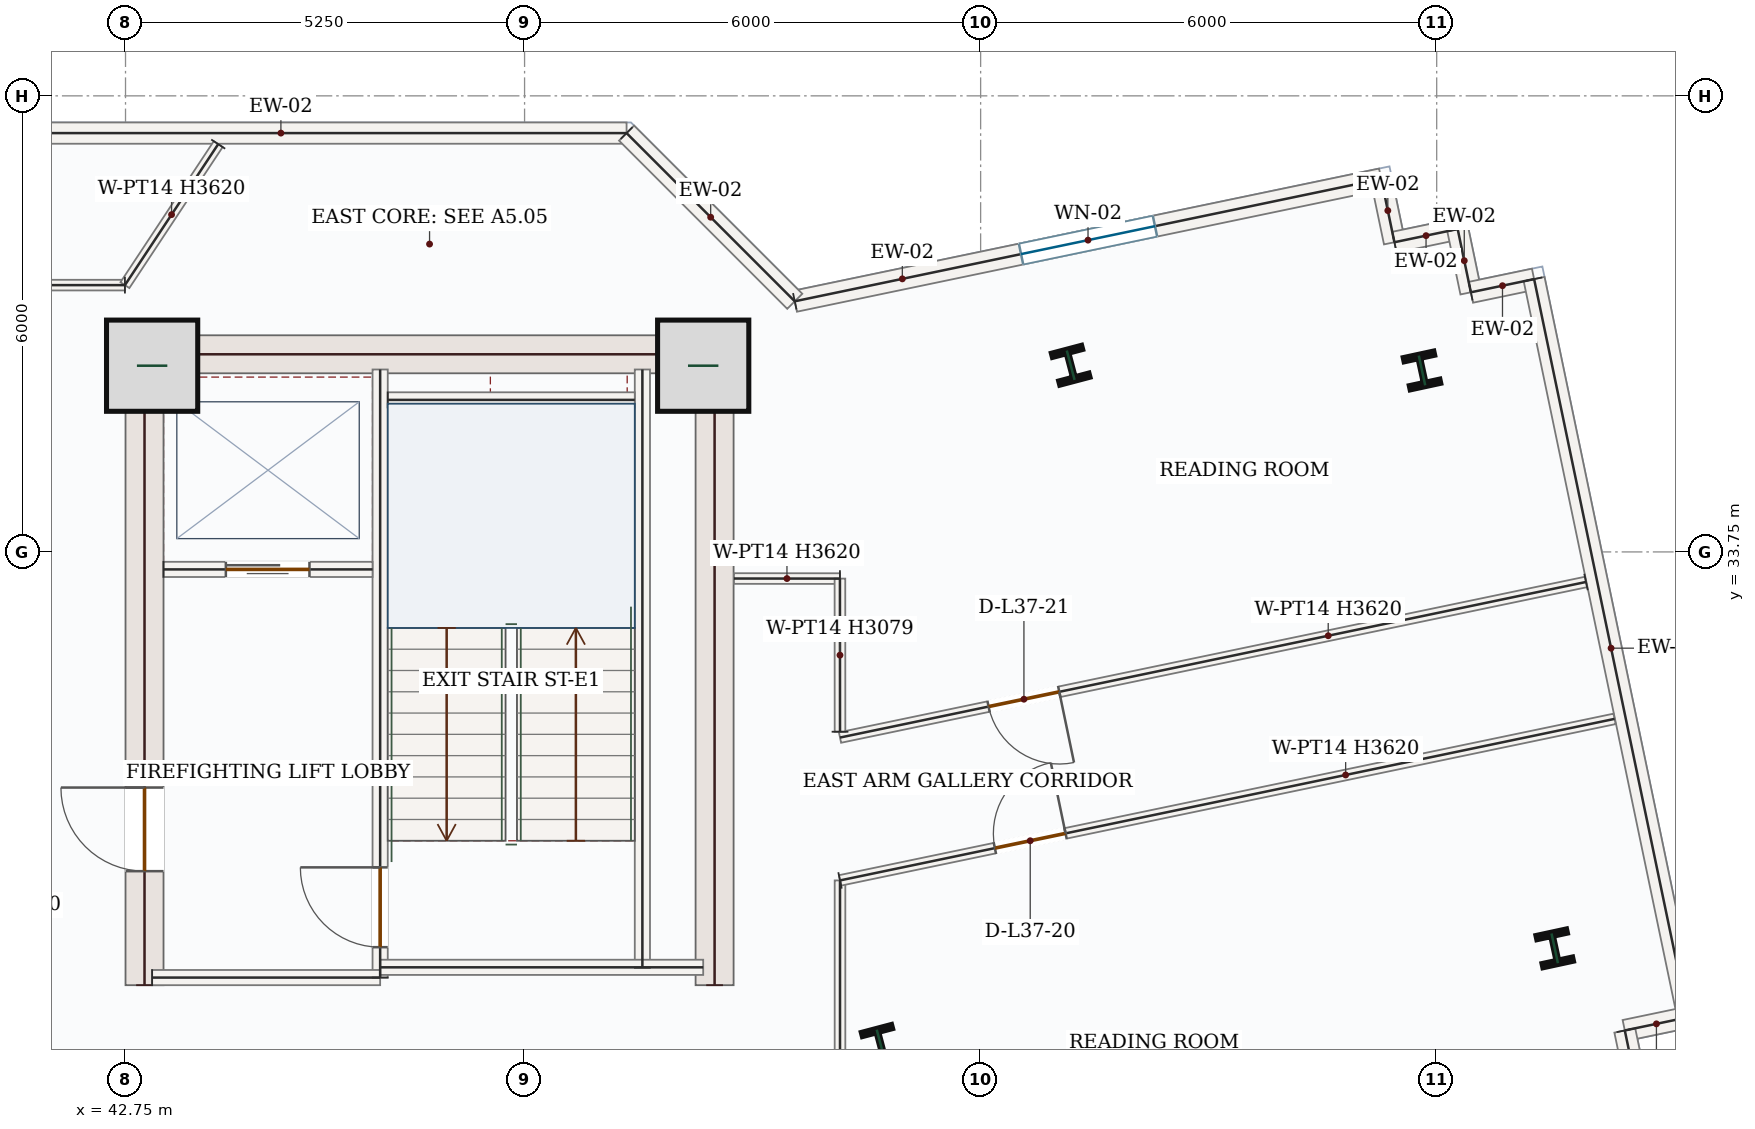
"""IFC4 building model, lengths in metres.
Left out: names, types, materials, properties, quantities, classifications, styles, units other than length and angle.
Written with IfcOpenShell. Run it as: python <this file> out.ifc"""

import sys

from ifc_helpers import new_model, si_unit, direction, frame, frame_2d, origin, origin_2d, place, context, subcontext, project, spatial, rectangle, i_section, extrude, source, transform, mapped, element, fill, save


model = new_model("IFC4")
c1 = context("Model", 3, precision=1e-05, world=origin(), true_north=direction((0.0, 1.0)))
c2 = subcontext(c1, "Body", "Model", "MODEL_VIEW")
j1 = project(units=[si_unit("LENGTHUNIT", "METRE"), si_unit("PLANEANGLEUNIT", "RADIAN")], contexts=[c1])
p1 = place(None, origin())
s1 = spatial("IfcSite", under=j1, at=p1, CompositionType="ELEMENT")
p2 = place(p1, origin())
s2 = spatial("IfcBuilding", under=s1, at=p2, CompositionType="ELEMENT")
p3 = place(p2, frame((0.0, 0.0, 162.9)))
s3 = spatial("IfcBuildingStorey", under=s2, at=p3, CompositionType="ELEMENT", Elevation=162.9)
p4 = place(p3, frame((43.0, 28.05, 0.0), z_axis=(0.0, 0.0, 1.0), x_axis=(0.0, 1.0, 0.0)))
e1 = element("IfcWall", 1, at=p4, inside=s3, PredefinedType="SHEAR", context=c2, shape_type="SweptSolid", body=[
    extrude(rectangle(XDim=8.55, YDim=0.5, at=frame_2d((4.275, 0.0))), origin(), (0.0, 0.0, 1.0), 3.62),
])
p5 = place(p4, frame((1.5, 0.0, 0.0)))
e2 = element("IfcOpeningElement", 2, at=p5, cuts=e1, PredefinedType="OPENING", context=c2, shape_type="SweptSolid", body=[
    extrude(rectangle(XDim=1.1, YDim=2.2, at=frame_2d((0.55, 1.1))), frame((0.0, 0.26, 0.0), z_axis=(0.0, -1.0, 0.0), x_axis=(1.0, 0.0, 0.0)), (0.0, 0.0, 1.0), 0.52),
])
m1 = source(origin(), c2, "Body", "SweptSolid", [
    extrude(rectangle(XDim=8.55, YDim=0.5, at=frame_2d((4.275, 0.0))), origin(), (0.0, 0.0, 1.0), 3.62),
])
p6 = place(p3, frame((50.5, 28.05, 0.0), z_axis=(0.0, 0.0, 1.0), x_axis=(0.0, 1.0, 0.0)))
e3 = element("IfcWall", 3, at=p6, inside=s3, PredefinedType="SHEAR", context=c2, shape_type="MappedRepresentation", body=[
    mapped(m1, transform((0.0, 0.0, 0.0), x_axis=(1.0, 0.0, 0.0), y_axis=(0.0, 1.0, 0.0), z_axis=(0.0, 0.0, 1.0), scale=1.0)),
])
m2 = source(origin(), c2, "Body", "SweptSolid", [
    extrude(rectangle(XDim=7.0, YDim=0.5, at=frame_2d((3.5, 0.0))), origin(), (0.0, 0.0, 1.0), 3.62),
])
p7 = place(p3, frame((43.25, 36.35, 0.0), z_axis=(0.0, 0.0, 1.0), x_axis=(1.0, 0.0, 0.0)))
e4 = element("IfcWall", 4, at=p7, inside=s3, PredefinedType="SHEAR", context=c2, shape_type="MappedRepresentation", body=[
    mapped(m2, transform((0.0, 0.0, 0.0), x_axis=(1.0, 0.0, 0.0), y_axis=(0.0, 1.0, 0.0), z_axis=(0.0, 0.0, 1.0), scale=1.0)),
])
m3 = source(origin(), c2, "Body", "SweptSolid", [
    extrude(rectangle(XDim=1.2, YDim=1.2, at=origin_2d()), origin(), (0.0, 0.0, 1.0), 3.9),
])
for number, where, z_axis, x_axis in (
    (5, (43.1, 36.2, 0.0), (0.0, 0.0, 1.0), (1.0, 0.0, 0.0)),
    (6, (50.35, 36.2, 0.0), (0.0, 0.0, 1.0), (1.0, 0.0, 0.0)),
):
    element("IfcColumn", number, at=place(p3, frame(where, z_axis=z_axis, x_axis=x_axis)), inside=s3, PredefinedType="COLUMN", context=c2, shape_type="MappedRepresentation", body=[
        mapped(m3, transform((0.0, 0.0, 0.0), x_axis=(1.0, 0.0, 0.0), y_axis=(0.0, 1.0, 0.0), z_axis=(0.0, 0.0, 1.0), scale=1.0)),
    ])
m4 = source(origin(), c2, "Body", "SweptSolid", [
    extrude(i_section(OverallWidth=0.412, OverallDepth=0.435, WebThickness=0.036, FlangeThickness=0.057, FilletRadius=0.018, at=origin_2d()), origin(), (0.0, 0.0, 1.0), 3.9),
])
for number, where, z_axis, x_axis in (
    (7, (52.684, 27.271, 0.0), (0.0, 0.0, 1.0), (0.967, 0.255, 0.0)),
    (8, (55.185, 36.206, 0.0), (0.0, 0.0, 1.0), (0.967, 0.255, 0.0)),
    (9, (61.553, 28.535, 0.0), (0.0, 0.0, 1.0), (0.977, 0.211, 0.0)),
    (10, (59.807, 36.137, 0.0), (0.0, 0.0, 1.0), (0.977, 0.211, 0.0)),
):
    element("IfcColumn", number, at=place(p3, frame(where, z_axis=z_axis, x_axis=x_axis)), inside=s3, PredefinedType="COLUMN", context=c2, shape_type="MappedRepresentation", body=[
        mapped(m4, transform((0.0, 0.0, 0.0), x_axis=(1.0, 0.0, 0.0), y_axis=(0.0, 1.0, 0.0), z_axis=(0.0, 0.0, 1.0), scale=1.0)),
    ])
p8 = place(p3, frame((51.555, 37.047, 0.0), z_axis=(0.0, 0.0, 1.0), x_axis=(0.978938136474, 0.204157108515, 0.0)))
e11 = element("IfcWall", 11, at=p8, inside=s3, PredefinedType="SOLIDWALL", context=c2, shape_type="SweptSolid", body=[
    extrude(rectangle(XDim=7.882, YDim=0.28, at=frame_2d((3.941, 0.0))), origin(), (0.0, 0.0, 1.0), 3.62),
])
p9 = place(p8, frame((3.041, 0.0, 0.85)))
e12 = element("IfcOpeningElement", 12, at=p9, cuts=e11, PredefinedType="OPENING", context=c2, shape_type="SweptSolid", body=[
    extrude(rectangle(XDim=1.8, YDim=1.75, at=frame_2d((0.9, 0.875))), frame((0.0, 0.15, 0.0), z_axis=(0.0, -1.0, 0.0), x_axis=(1.0, 0.0, 0.0)), (0.0, 0.0, 1.0), 0.3),
])
m5 = source(origin(), c2, "Body", "SweptSolid", [
    extrude(rectangle(XDim=0.85, YDim=0.28, at=frame_2d((0.425, 0.0))), origin(), (0.0, 0.0, 1.0), 3.62),
])
for number, where, z_axis, x_axis in (
    (13, (59.271, 38.656, 0.0), (0.0, 0.0, 1.0), (0.204, -0.979, 0.0)),
    (14, (59.444, 37.824, 0.0), (0.0, 0.0, 1.0), (0.979, 0.204, 0.0)),
):
    element("IfcWall", number, at=place(p3, frame(where, z_axis=z_axis, x_axis=x_axis)), inside=s3, PredefinedType="SOLIDWALL", context=c2, shape_type="MappedRepresentation", body=[
        mapped(m5, transform((0.0, 0.0, 0.0), x_axis=(1.0, 0.0, 0.0), y_axis=(0.0, 1.0, 0.0), z_axis=(0.0, 0.0, 1.0), scale=1.0)),
    ])
m6 = source(origin(), c2, "Body", "SweptSolid", [
    extrude(rectangle(XDim=0.85, YDim=0.28, at=frame_2d((0.425, 0.0))), origin(), (0.0, 0.0, 1.0), 3.62),
])
p10 = place(p3, frame((60.276, 37.998, 0.0), z_axis=(0.0, 0.0, 1.0), x_axis=(0.204447295999, -0.978877573121, 0.0)))
e15 = element("IfcWall", 15, at=p10, inside=s3, PredefinedType="SOLIDWALL", context=c2, shape_type="MappedRepresentation", body=[
    mapped(m6, transform((0.0, 0.0, 0.0), x_axis=(1.0, 0.0, 0.0), y_axis=(0.0, 1.0, 0.0), z_axis=(0.0, 0.0, 1.0), scale=1.0)),
])
p11 = place(p3, frame((60.45, 37.166, 0.0), z_axis=(0.0, 0.0, 1.0), x_axis=(0.978923028084, 0.20422954019, 0.0)))
e16 = element("IfcWall", 16, at=p11, inside=s3, PredefinedType="SOLIDWALL", context=c2, shape_type="MappedRepresentation", body=[
    mapped(m5, transform((0.0, 0.0, 0.0), x_axis=(1.0, 0.0, 0.0), y_axis=(0.0, 1.0, 0.0), z_axis=(0.0, 0.0, 1.0), scale=1.0)),
])
m7 = source(origin(), c2, "Body", "SweptSolid", [
    extrude(rectangle(XDim=9.92, YDim=0.28, at=frame_2d((4.96, 0.0))), origin(), (0.0, 0.0, 1.0), 3.62),
])
p12 = place(p3, frame((61.282, 37.339, 0.0), z_axis=(0.0, 0.0, 1.0), x_axis=(0.204150812873, -0.978939449406, 0.0)))
e17 = element("IfcWall", 17, at=p12, inside=s3, PredefinedType="SOLIDWALL", context=c2, shape_type="MappedRepresentation", body=[
    mapped(m7, transform((0.0, 0.0, 0.0), x_axis=(1.0, 0.0, 0.0), y_axis=(0.0, 1.0, 0.0), z_axis=(0.0, 0.0, 1.0), scale=1.0)),
])
for number, where, z_axis, x_axis in (
    (18, (63.307, 27.628, 0.0), (0.0, 0.0, 1.0), (-0.979, -0.204, 0.0)),
    (19, (62.475, 27.455, 0.0), (0.0, 0.0, 1.0), (0.204, -0.979, 0.0)),
):
    element("IfcWall", number, at=place(p3, frame(where, z_axis=z_axis, x_axis=x_axis)), inside=s3, PredefinedType="SOLIDWALL", context=c2, shape_type="MappedRepresentation", body=[
        mapped(m5, transform((0.0, 0.0, 0.0), x_axis=(1.0, 0.0, 0.0), y_axis=(0.0, 1.0, 0.0), z_axis=(0.0, 0.0, 1.0), scale=1.0)),
    ])
m8 = source(origin(), c2, "Body", "SweptSolid", [
    extrude(rectangle(XDim=9.095, YDim=0.28, at=frame_2d((4.548, 0.0))), origin(), (0.0, 0.0, 1.0), 3.62),
])
p13 = place(p3, frame((40.247, 39.26, 0.0), z_axis=(0.0, 0.0, 1.0), x_axis=(1.0, 0.0, 0.0)))
e20 = element("IfcWall", 20, at=p13, inside=s3, PredefinedType="SOLIDWALL", context=c2, shape_type="MappedRepresentation", body=[
    mapped(m8, transform((0.0, 0.0, 0.0), x_axis=(1.0, 0.0, 0.0), y_axis=(0.0, 1.0, 0.0), z_axis=(0.0, 0.0, 1.0), scale=1.0)),
])
m9 = source(origin(), c2, "Body", "SweptSolid", [
    extrude(rectangle(XDim=3.129, YDim=0.28, at=frame_2d((1.565, 0.0))), origin(), (0.0, 0.0, 1.0), 3.62),
])
p14 = place(p3, frame((49.342, 39.26, 0.0), z_axis=(0.0, 0.0, 1.0), x_axis=(0.707067771627, -0.707145788594, 0.0)))
e21 = element("IfcWall", 21, at=p14, inside=s3, PredefinedType="SOLIDWALL", context=c2, shape_type="MappedRepresentation", body=[
    mapped(m9, transform((0.0, 0.0, 0.0), x_axis=(1.0, 0.0, 0.0), y_axis=(0.0, 1.0, 0.0), z_axis=(0.0, 0.0, 1.0), scale=1.0)),
])
m10 = source(origin(), c2, "Body", "SweptSolid", [
    extrude(rectangle(XDim=7.87, YDim=0.2, at=frame_2d((3.935, 0.0))), origin(), (0.0, 0.0, 1.0), 3.62),
])
p15 = place(p3, frame((49.55, 28.28, 0.0), z_axis=(0.0, 0.0, 1.0), x_axis=(0.0, 1.0, 0.0)))
e22 = element("IfcWall", 22, at=p15, inside=s3, PredefinedType="SOLIDWALL", context=c2, shape_type="MappedRepresentation", body=[
    mapped(m10, transform((0.0, 0.0, 0.0), x_axis=(1.0, 0.0, 0.0), y_axis=(0.0, 1.0, 0.0), z_axis=(0.0, 0.0, 1.0), scale=1.0)),
])
p16 = place(p3, frame((46.1, 28.15, 0.0), z_axis=(0.0, 0.0, 1.0), x_axis=(0.0, 1.0, 0.0)))
e23 = element("IfcWall", 23, at=p16, inside=s3, PredefinedType="SOLIDWALL", context=c2, shape_type="SweptSolid", body=[
    extrude(rectangle(XDim=8.0, YDim=0.2, at=frame_2d((4.0, 0.0))), origin(), (0.0, 0.0, 1.0), 3.62),
])
p17 = place(p16, frame((0.4, 0.0, 0.0)))
e24 = element("IfcOpeningElement", 24, at=p17, cuts=e23, PredefinedType="OPENING", context=c2, shape_type="SweptSolid", body=[
    extrude(rectangle(XDim=1.05, YDim=2.15, at=frame_2d((0.525, 1.075))), frame((0.0, 0.11, 0.0), z_axis=(0.0, -1.0, 0.0), x_axis=(1.0, 0.0, 0.0)), (0.0, 0.0, 1.0), 0.22),
])
m11 = source(origin(), c2, "Body", "SweptSolid", [
    extrude(rectangle(XDim=3.0, YDim=0.2, at=frame_2d((1.5, 0.0))), origin(), (0.0, 0.0, 1.0), 3.62),
])
p18 = place(p3, frame((43.1, 28.15, 0.0), z_axis=(0.0, 0.0, 1.0), x_axis=(1.0, 0.0, 0.0)))
e25 = element("IfcWall", 25, at=p18, inside=s3, PredefinedType="SOLIDWALL", context=c2, shape_type="MappedRepresentation", body=[
    mapped(m11, transform((0.0, 0.0, 0.0), x_axis=(1.0, 0.0, 0.0), y_axis=(0.0, 1.0, 0.0), z_axis=(0.0, 0.0, 1.0), scale=1.0)),
])
m12 = source(origin(), c2, "Body", "SweptSolid", [
    extrude(rectangle(XDim=4.25, YDim=0.2, at=frame_2d((2.125, 0.0))), origin(), (0.0, 0.0, 1.0), 3.62),
])
p19 = place(p3, frame((46.1, 28.285, 0.0), z_axis=(0.0, 0.0, 1.0), x_axis=(1.0, 0.0, 0.0)))
e26 = element("IfcWall", 26, at=p19, inside=s3, PredefinedType="SOLIDWALL", context=c2, shape_type="MappedRepresentation", body=[
    mapped(m12, transform((0.0, 0.0, 0.0), x_axis=(1.0, 0.0, 0.0), y_axis=(0.0, 1.0, 0.0), z_axis=(0.0, 0.0, 1.0), scale=1.0)),
])
m13 = source(origin(), c2, "Body", "SweptSolid", [
    extrude(rectangle(XDim=3.25, YDim=0.2, at=frame_2d((1.625, 0.0))), origin(), (0.0, 0.0, 1.0), 3.62),
])
p20 = place(p3, frame((46.2, 35.75, 0.0), z_axis=(0.0, 0.0, 1.0), x_axis=(1.0, 0.0, 0.0)))
e27 = element("IfcWall", 27, at=p20, inside=s3, PredefinedType="SOLIDWALL", context=c2, shape_type="MappedRepresentation", body=[
    mapped(m13, transform((0.0, 0.0, 0.0), x_axis=(1.0, 0.0, 0.0), y_axis=(0.0, 1.0, 0.0), z_axis=(0.0, 0.0, 1.0), scale=1.0)),
])
p21 = place(p3, frame((43.25, 33.52, 0.0), z_axis=(0.0, 0.0, 1.0), x_axis=(1.0, 0.0, 0.0)))
e28 = element("IfcWall", 28, at=p21, inside=s3, PredefinedType="SOLIDWALL", context=c2, shape_type="SweptSolid", body=[
    extrude(rectangle(XDim=2.75, YDim=0.2, at=frame_2d((1.375, 0.0))), origin(), (0.0, 0.0, 1.0), 3.62),
])
p22 = place(p21, frame((0.82, 0.0, 0.0)))
e29 = element("IfcOpeningElement", 29, at=p22, cuts=e28, PredefinedType="OPENING", context=c2, shape_type="SweptSolid", body=[
    extrude(rectangle(XDim=1.1, YDim=2.15, at=frame_2d((0.55, 1.075))), frame((0.0, 0.11, 0.0), z_axis=(0.0, -1.0, 0.0), x_axis=(1.0, 0.0, 0.0)), (0.0, 0.0, 1.0), 0.22),
])
p23 = place(p3, frame((42.742, 37.26, 0.0), z_axis=(0.0, 0.0, 1.0), x_axis=(-1.0, 0.0, 0.0)))
e30 = element("IfcWall", 30, at=p23, inside=s3, PredefinedType="PARTITIONING", context=c2, shape_type="SweptSolid", body=[
    extrude(rectangle(XDim=7.942, YDim=0.14, at=frame_2d((3.971, 0.0))), origin(), (0.0, 0.0, 1.0), 3.62),
])
p24 = place(p23, frame((5.454, 0.0, 0.0)))
e31 = element("IfcOpeningElement", 31, at=p24, cuts=e30, PredefinedType="OPENING", context=c2, shape_type="SweptSolid", body=[
    extrude(rectangle(XDim=0.95, YDim=2.15, at=frame_2d((0.475, 1.075))), frame((0.0, 0.08, 0.0), z_axis=(0.0, -1.0, 0.0), x_axis=(1.0, 0.0, 0.0)), (0.0, 0.0, 1.0), 0.16),
])
m14 = source(origin(), c2, "Body", "SweptSolid", [
    extrude(rectangle(XDim=2.224, YDim=0.14, at=frame_2d((1.112, 0.0))), origin(), (0.0, 0.0, 1.0), 3.62),
])
p25 = place(p3, frame((43.969, 39.115, 0.0), z_axis=(0.0, 0.0, 1.0), x_axis=(-0.551783828078, -0.833987174405, 0.0)))
e32 = element("IfcWall", 32, at=p25, inside=s3, PredefinedType="PARTITIONING", context=c2, shape_type="MappedRepresentation", body=[
    mapped(m14, transform((0.0, 0.0, 0.0), x_axis=(1.0, 0.0, 0.0), y_axis=(0.0, 1.0, 0.0), z_axis=(0.0, 0.0, 1.0), scale=1.0)),
])
m15 = source(origin(), c2, "Body", "SweptSolid", [
    extrude(rectangle(XDim=8.821, YDim=0.14, at=frame_2d((4.41, 0.0))), origin(), (0.0, 0.0, 1.0), 2.693),
])
p26 = place(p3, frame((52.15, 20.608, 0.0), z_axis=(0.0, 0.0, 1.0), x_axis=(2.7678596e-05, 0.999999999617, 0.0)))
e33 = element("IfcWall", 33, at=p26, inside=s3, PredefinedType="PARTITIONING", context=c2, shape_type="MappedRepresentation", body=[
    mapped(m15, transform((0.0, 0.0, 0.0), x_axis=(1.0, 0.0, 0.0), y_axis=(0.0, 1.0, 0.0), z_axis=(0.0, 0.0, 1.0), scale=1.0)),
])
p27 = place(p3, frame((52.15, 29.428, 0.0), z_axis=(0.0, 0.0, 1.0), x_axis=(0.978935516763, 0.204169669688, 0.0)))
e34 = element("IfcWall", 34, at=p27, inside=s3, PredefinedType="PARTITIONING", context=c2, shape_type="SweptSolid", body=[
    extrude(rectangle(XDim=10.409, YDim=0.14, at=frame_2d((5.205, 0.0))), origin(), (0.0, 0.0, 1.0), 3.62),
])
p28 = place(p27, frame((2.081, 0.0, 0.0)))
e35 = element("IfcOpeningElement", 35, at=p28, cuts=e34, PredefinedType="OPENING", context=c2, shape_type="SweptSolid", body=[
    extrude(rectangle(XDim=0.95, YDim=2.15, at=frame_2d((0.475, 1.075))), frame((0.0, 0.08, 0.0), z_axis=(0.0, -1.0, 0.0), x_axis=(1.0, 0.0, 0.0)), (0.0, 0.0, 1.0), 0.16),
])
m16 = source(origin(), c2, "Body", "SweptSolid", [
    extrude(rectangle(XDim=1.394, YDim=0.14, at=frame_2d((0.697, 0.0))), origin(), (0.0, 0.0, 1.0), 3.62),
])
p29 = place(p3, frame((52.149, 33.399, 0.0), z_axis=(0.0, 0.0, 1.0), x_axis=(-0.999999754632, 0.000700525222, 0.0)))
e36 = element("IfcWall", 36, at=p29, inside=s3, PredefinedType="PARTITIONING", context=c2, shape_type="MappedRepresentation", body=[
    mapped(m16, transform((0.0, 0.0, 0.0), x_axis=(1.0, 0.0, 0.0), y_axis=(0.0, 1.0, 0.0), z_axis=(0.0, 0.0, 1.0), scale=1.0)),
])
p30 = place(p3, frame((61.965, 33.354, 0.0), z_axis=(0.0, 0.0, 1.0), x_axis=(-0.978942518705, -0.204136094483, 0.0)))
e37 = element("IfcWall", 37, at=p30, inside=s3, PredefinedType="PARTITIONING", context=c2, shape_type="SweptSolid", body=[
    extrude(rectangle(XDim=10.026, YDim=0.14, at=frame_2d((5.013, 0.0))), origin(), (0.0, 0.0, 1.0), 3.62),
])
p31 = place(p30, frame((7.079, 0.0, 0.0)))
e38 = element("IfcOpeningElement", 38, at=p31, cuts=e37, PredefinedType="OPENING", context=c2, shape_type="SweptSolid", body=[
    extrude(rectangle(XDim=0.95, YDim=2.15, at=frame_2d((0.475, 1.075))), frame((0.0, 0.08, 0.0), z_axis=(0.0, -1.0, 0.0), x_axis=(1.0, 0.0, 0.0)), (0.0, 0.0, 1.0), 0.16),
])
m17 = source(origin(), c2, "Body", "SweptSolid", [
    extrude(rectangle(XDim=2.014, YDim=0.14, at=frame_2d((1.007, 0.0))), origin(), (0.0, 0.0, 1.0), 3.079),
])
p32 = place(p3, frame((52.15, 31.385, 0.0), z_axis=(0.0, 0.0, 1.0), x_axis=(-0.000484789665, 0.999999882489, 0.0)))
e39 = element("IfcWall", 39, at=p32, inside=s3, PredefinedType="PARTITIONING", context=c2, shape_type="MappedRepresentation", body=[
    mapped(m17, transform((0.0, 0.0, 0.0), x_axis=(1.0, 0.0, 0.0), y_axis=(0.0, 1.0, 0.0), z_axis=(0.0, 0.0, 1.0), scale=1.0)),
])
m18 = source(origin(), c2, "Body", "SweptSolid", [
    extrude(rectangle(XDim=1.8, YDim=1.75, at=frame_2d((0.9, 0.875))), frame((0.0, 0.03, 0.0), z_axis=(0.0, -1.0, 0.0), x_axis=(1.0, 0.0, 0.0)), (0.0, 0.0, 1.0), 0.06),
])
p33 = place(p9, origin())
e40 = element("IfcWindow", 40, at=p33, inside=s3, PartitioningType="DOUBLE_PANEL_VERTICAL", PredefinedType="WINDOW", context=c2, shape_type="MappedRepresentation", body=[
    mapped(m18, transform((0.0, 0.0, 0.0), x_axis=(1.0, 0.0, 0.0), y_axis=(0.0, 1.0, 0.0), z_axis=(0.0, 0.0, 1.0), scale=1.0)),
])
fill(e12, e40)
m19 = source(origin(), c2, "Body", "SweptSolid", [
    extrude(rectangle(XDim=1.05, YDim=2.15, at=frame_2d((0.525, 1.075))), frame((0.0, 0.025, 0.0), z_axis=(0.0, -1.0, 0.0), x_axis=(1.0, 0.0, 0.0)), (0.0, 0.0, 1.0), 0.05),
])
p34 = place(p17, origin())
e41 = element("IfcDoor", 41, at=p34, inside=s3, OperationType="SINGLE_SWING_RIGHT", PredefinedType="DOOR", context=c2, shape_type="MappedRepresentation", body=[
    mapped(m19, transform((0.0, 0.0, 0.0), x_axis=(1.0, 0.0, 0.0), y_axis=(0.0, 1.0, 0.0), z_axis=(0.0, 0.0, 1.0), scale=1.0)),
])
fill(e24, e41)
m20 = source(origin(), c2, "Body", "SweptSolid", [
    extrude(rectangle(XDim=1.1, YDim=2.15, at=frame_2d((0.55, 1.075))), frame((0.0, 0.025, 0.0), z_axis=(0.0, -1.0, 0.0), x_axis=(1.0, 0.0, 0.0)), (0.0, 0.0, 1.0), 0.05),
])
p35 = place(p22, origin())
e42 = element("IfcDoor", 42, at=p35, inside=s3, OperationType="DOUBLE_DOOR_SLIDING", PredefinedType="DOOR", context=c2, shape_type="MappedRepresentation", body=[
    mapped(m20, transform((0.0, 0.0, 0.0), x_axis=(1.0, 0.0, 0.0), y_axis=(0.0, 1.0, 0.0), z_axis=(0.0, 0.0, 1.0), scale=1.0)),
])
fill(e29, e42)
m21 = source(origin(), c2, "Body", "SweptSolid", [
    extrude(rectangle(XDim=1.1, YDim=2.2, at=frame_2d((0.55, 1.1))), frame((0.0, 0.025, 0.0), z_axis=(0.0, -1.0, 0.0), x_axis=(1.0, 0.0, 0.0)), (0.0, 0.0, 1.0), 0.05),
])
p36 = place(p5, origin())
e43 = element("IfcDoor", 43, at=p36, inside=s3, OperationType="SINGLE_SWING_RIGHT", PredefinedType="DOOR", context=c2, shape_type="MappedRepresentation", body=[
    mapped(m21, transform((0.0, 0.0, 0.0), x_axis=(1.0, 0.0, 0.0), y_axis=(0.0, 1.0, 0.0), z_axis=(0.0, 0.0, 1.0), scale=1.0)),
])
fill(e2, e43)
m22 = source(origin(), c2, "Body", "SweptSolid", [
    extrude(rectangle(XDim=0.95, YDim=2.15, at=frame_2d((0.475, 1.075))), frame((0.0, 0.025, 0.0), z_axis=(0.0, -1.0, 0.0), x_axis=(1.0, 0.0, 0.0)), (0.0, 0.0, 1.0), 0.05),
])
p37 = place(p28, origin())
e44 = element("IfcDoor", 44, at=p37, inside=s3, OperationType="SINGLE_SWING_RIGHT", PredefinedType="DOOR", context=c2, shape_type="MappedRepresentation", body=[
    mapped(m22, transform((0.0, 0.0, 0.0), x_axis=(1.0, 0.0, 0.0), y_axis=(0.0, 1.0, 0.0), z_axis=(0.0, 0.0, 1.0), scale=1.0)),
])
fill(e35, e44)
p38 = place(p31, origin())
e45 = element("IfcDoor", 45, at=p38, inside=s3, OperationType="SINGLE_SWING_LEFT", PredefinedType="DOOR", context=c2, shape_type="MappedRepresentation", body=[
    mapped(m22, transform((0.0, 0.0, 0.0), x_axis=(1.0, 0.0, 0.0), y_axis=(0.0, 1.0, 0.0), z_axis=(0.0, 0.0, 1.0), scale=1.0)),
])
fill(e38, e45)
save(model, sys.argv[1])
